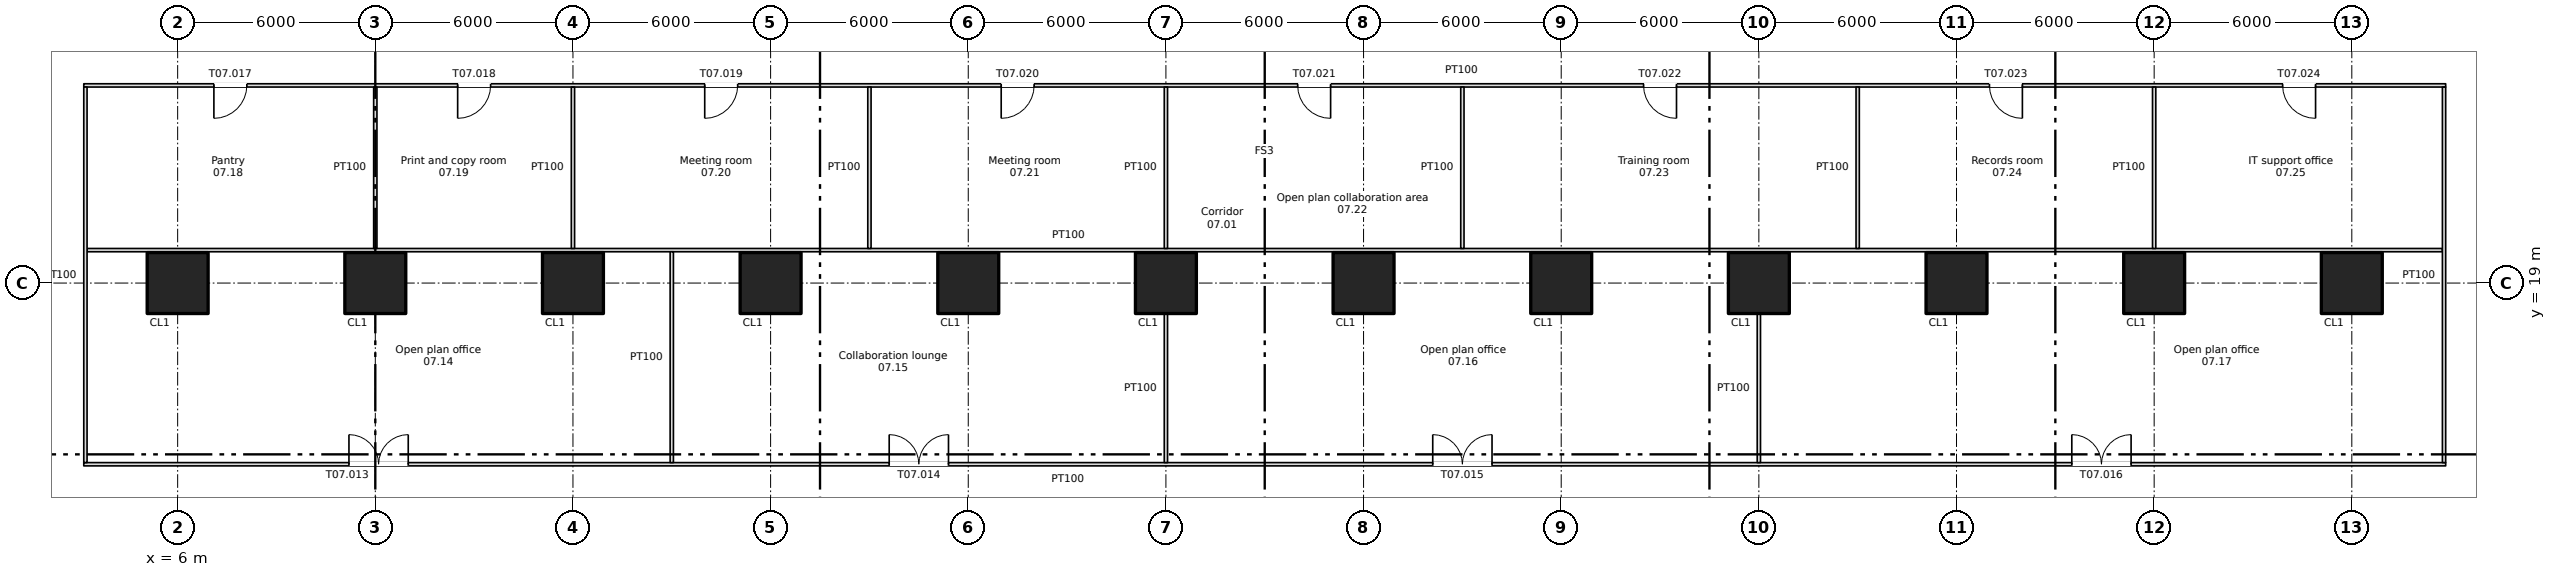
"""IFC4 building model, lengths in metres.
Left out: names, types, materials, properties, quantities, classifications, styles, units other than length and angle.
Written with IfcOpenShell. Run it as: python <this file> out.ifc"""

import sys

from ifc_helpers import new_model, si_unit, direction, frame, frame_2d, origin, origin_2d, place, context, subcontext, project, spatial, rectangle, extrude, element, fill, save


model = new_model("IFC4")
c1 = context("Model", 3, precision=1e-05, world=origin(), true_north=direction((0.0, 1.0)))
c2 = subcontext(c1, "Body", "Model", "MODEL_VIEW")
j1 = project(units=[si_unit("LENGTHUNIT", "METRE"), si_unit("PLANEANGLEUNIT", "RADIAN")], contexts=[c1])
p1 = place(None, origin())
s1 = spatial("IfcSite", under=j1, at=p1, CompositionType="ELEMENT")
p2 = place(p1, origin())
s2 = spatial("IfcBuilding", under=s1, at=p2, CompositionType="ELEMENT")
p3 = place(p2, frame((0.0, 0.0, 26.25)))
s3 = spatial("IfcBuildingStorey", under=s2, at=p3, CompositionType="ELEMENT", Elevation=26.25)
for number, where, z_axis, x_axis in (
    (1, (6.0, 19.0, 0.0), (0.0, 0.0, 1.0), (1.0, 0.0, 0.0)),
    (2, (12.0, 19.0, 0.0), (0.0, 0.0, 1.0), (1.0, 0.0, 0.0)),
    (3, (18.0, 19.0, 0.0), (0.0, 0.0, 1.0), (1.0, 0.0, 0.0)),
    (4, (24.0, 19.0, 0.0), (0.0, 0.0, 1.0), (1.0, 0.0, 0.0)),
    (5, (30.0, 19.0, 0.0), (0.0, 0.0, 1.0), (1.0, 0.0, 0.0)),
    (6, (36.0, 19.0, 0.0), (0.0, 0.0, 1.0), (1.0, 0.0, 0.0)),
    (7, (42.0, 19.0, 0.0), (0.0, 0.0, 1.0), (1.0, 0.0, 0.0)),
    (8, (48.0, 19.0, 0.0), (0.0, 0.0, 1.0), (1.0, 0.0, 0.0)),
    (9, (54.0, 19.0, 0.0), (0.0, 0.0, 1.0), (1.0, 0.0, 0.0)),
    (10, (60.0, 19.0, 0.0), (0.0, 0.0, 1.0), (1.0, 0.0, 0.0)),
    (11, (66.0, 19.0, 0.0), (0.0, 0.0, 1.0), (1.0, 0.0, 0.0)),
    (12, (72.0, 19.0, 0.0), (0.0, 0.0, 1.0), (1.0, 0.0, 0.0)),
):
    element("IfcColumn", number, at=place(p3, frame(where, z_axis=z_axis, x_axis=x_axis)), inside=s3, PredefinedType="COLUMN", context=c2, shape_type="SweptSolid", body=[
        extrude(rectangle(XDim=1.85, YDim=1.85, at=origin_2d()), origin(), (0.0, 0.0, 1.0), 3.35),
    ])
p4 = place(p3, frame((3.15, 13.5, 0.0), z_axis=(0.0, 0.0, 1.0), x_axis=(1.0, 0.0, 0.0)))
e13 = element("IfcWall", 13, at=p4, inside=s3, PredefinedType="PARTITIONING", context=c2, shape_type="SweptSolid", body=[
    extrude(rectangle(XDim=71.7, YDim=0.1, at=frame_2d((35.85, 0.0))), origin(), (0.0, 0.0, 1.0), 3.35),
])
p5 = place(p4, frame((8.05, 0.0, 0.0)))
e14 = element("IfcOpeningElement", 14, at=p5, cuts=e13, PredefinedType="OPENING", context=c2, shape_type="SweptSolid", body=[
    extrude(rectangle(XDim=1.8, YDim=2.1, at=frame_2d((0.9, 1.05))), frame((0.0, 0.06, 0.0), z_axis=(0.0, -1.0, 0.0), x_axis=(1.0, 0.0, 0.0)), (0.0, 0.0, 1.0), 0.12),
])
p6 = place(p4, frame((24.45, 0.0, 0.0)))
e15 = element("IfcOpeningElement", 15, at=p6, cuts=e13, PredefinedType="OPENING", context=c2, shape_type="SweptSolid", body=[
    extrude(rectangle(XDim=1.8, YDim=2.1, at=frame_2d((0.9, 1.05))), frame((0.0, 0.06, 0.0), z_axis=(0.0, -1.0, 0.0), x_axis=(1.0, 0.0, 0.0)), (0.0, 0.0, 1.0), 0.12),
])
p7 = place(p4, frame((40.95, 0.0, 0.0)))
e16 = element("IfcOpeningElement", 16, at=p7, cuts=e13, PredefinedType="OPENING", context=c2, shape_type="SweptSolid", body=[
    extrude(rectangle(XDim=1.8, YDim=2.1, at=frame_2d((0.9, 1.05))), frame((0.0, 0.06, 0.0), z_axis=(0.0, -1.0, 0.0), x_axis=(1.0, 0.0, 0.0)), (0.0, 0.0, 1.0), 0.12),
])
p8 = place(p4, frame((60.35, 0.0, 0.0)))
e17 = element("IfcOpeningElement", 17, at=p8, cuts=e13, PredefinedType="OPENING", context=c2, shape_type="SweptSolid", body=[
    extrude(rectangle(XDim=1.8, YDim=2.1, at=frame_2d((0.9, 1.05))), frame((0.0, 0.06, 0.0), z_axis=(0.0, -1.0, 0.0), x_axis=(1.0, 0.0, 0.0)), (0.0, 0.0, 1.0), 0.12),
])
p9 = place(p3, frame((3.25, 20.0, 0.0), z_axis=(0.0, 0.0, 1.0), x_axis=(1.0, 0.0, 0.0)))
e18 = element("IfcWall", 18, at=p9, inside=s3, PredefinedType="PARTITIONING", context=c2, shape_type="SweptSolid", body=[
    extrude(rectangle(XDim=71.5, YDim=0.1, at=frame_2d((35.75, 0.0))), origin(), (0.0, 0.0, 1.0), 3.35),
])
p10 = place(p3, frame((3.15, 25.0, 0.0), z_axis=(0.0, 0.0, 1.0), x_axis=(1.0, 0.0, 0.0)))
e19 = element("IfcWall", 19, at=p10, inside=s3, PredefinedType="PARTITIONING", context=c2, shape_type="SweptSolid", body=[
    extrude(rectangle(XDim=71.7, YDim=0.1, at=frame_2d((35.85, 0.0))), origin(), (0.0, 0.0, 1.0), 3.35),
])
p11 = place(p10, frame((3.95, 0.0, 0.0)))
e20 = element("IfcOpeningElement", 20, at=p11, cuts=e19, PredefinedType="OPENING", context=c2, shape_type="SweptSolid", body=[
    extrude(rectangle(XDim=1.0, YDim=2.1, at=frame_2d((0.5, 1.05))), frame((0.0, 0.06, 0.0), z_axis=(0.0, -1.0, 0.0), x_axis=(1.0, 0.0, 0.0)), (0.0, 0.0, 1.0), 0.12),
])
p12 = place(p10, frame((11.35, 0.0, 0.0)))
e21 = element("IfcOpeningElement", 21, at=p12, cuts=e19, PredefinedType="OPENING", context=c2, shape_type="SweptSolid", body=[
    extrude(rectangle(XDim=1.0, YDim=2.1, at=frame_2d((0.5, 1.05))), frame((0.0, 0.06, 0.0), z_axis=(0.0, -1.0, 0.0), x_axis=(1.0, 0.0, 0.0)), (0.0, 0.0, 1.0), 0.12),
])
p13 = place(p10, frame((18.85, 0.0, 0.0)))
e22 = element("IfcOpeningElement", 22, at=p13, cuts=e19, PredefinedType="OPENING", context=c2, shape_type="SweptSolid", body=[
    extrude(rectangle(XDim=1.0, YDim=2.1, at=frame_2d((0.5, 1.05))), frame((0.0, 0.06, 0.0), z_axis=(0.0, -1.0, 0.0), x_axis=(1.0, 0.0, 0.0)), (0.0, 0.0, 1.0), 0.12),
])
p14 = place(p10, frame((27.85, 0.0, 0.0)))
e23 = element("IfcOpeningElement", 23, at=p14, cuts=e19, PredefinedType="OPENING", context=c2, shape_type="SweptSolid", body=[
    extrude(rectangle(XDim=1.0, YDim=2.1, at=frame_2d((0.5, 1.05))), frame((0.0, 0.06, 0.0), z_axis=(0.0, -1.0, 0.0), x_axis=(1.0, 0.0, 0.0)), (0.0, 0.0, 1.0), 0.12),
])
p15 = place(p10, frame((36.85, 0.0, 0.0)))
e24 = element("IfcOpeningElement", 24, at=p15, cuts=e19, PredefinedType="OPENING", context=c2, shape_type="SweptSolid", body=[
    extrude(rectangle(XDim=1.0, YDim=2.1, at=frame_2d((0.5, 1.05))), frame((0.0, 0.06, 0.0), z_axis=(0.0, -1.0, 0.0), x_axis=(1.0, 0.0, 0.0)), (0.0, 0.0, 1.0), 0.12),
])
p16 = place(p10, frame((47.35, 0.0, 0.0)))
e25 = element("IfcOpeningElement", 25, at=p16, cuts=e19, PredefinedType="OPENING", context=c2, shape_type="SweptSolid", body=[
    extrude(rectangle(XDim=1.0, YDim=2.1, at=frame_2d((0.5, 1.05))), frame((0.0, 0.06, 0.0), z_axis=(0.0, -1.0, 0.0), x_axis=(1.0, 0.0, 0.0)), (0.0, 0.0, 1.0), 0.12),
])
p17 = place(p10, frame((57.85, 0.0, 0.0)))
e26 = element("IfcOpeningElement", 26, at=p17, cuts=e19, PredefinedType="OPENING", context=c2, shape_type="SweptSolid", body=[
    extrude(rectangle(XDim=1.0, YDim=2.1, at=frame_2d((0.5, 1.05))), frame((0.0, 0.06, 0.0), z_axis=(0.0, -1.0, 0.0), x_axis=(1.0, 0.0, 0.0)), (0.0, 0.0, 1.0), 0.12),
])
p18 = place(p10, frame((66.75, 0.0, 0.0)))
e27 = element("IfcOpeningElement", 27, at=p18, cuts=e19, PredefinedType="OPENING", context=c2, shape_type="SweptSolid", body=[
    extrude(rectangle(XDim=1.0, YDim=2.1, at=frame_2d((0.5, 1.05))), frame((0.0, 0.06, 0.0), z_axis=(0.0, -1.0, 0.0), x_axis=(1.0, 0.0, 0.0)), (0.0, 0.0, 1.0), 0.12),
])
p19 = place(p3, frame((3.2, 13.55, 0.0), z_axis=(0.0, 0.0, 1.0), x_axis=(0.0, 1.0, 0.0)))
e28 = element("IfcWall", 28, at=p19, inside=s3, PredefinedType="PARTITIONING", context=c2, shape_type="SweptSolid", body=[
    extrude(rectangle(XDim=11.4, YDim=0.1, at=frame_2d((5.7, 0.0))), origin(), (0.0, 0.0, 1.0), 3.35),
])
for number, where, z_axis, x_axis in (
    (29, (12.0, 20.05, 0.0), (0.0, 0.0, 1.0), (0.0, 1.0, 0.0)),
    (30, (18.0, 20.05, 0.0), (0.0, 0.0, 1.0), (0.0, 1.0, 0.0)),
):
    element("IfcWall", number, at=place(p3, frame(where, z_axis=z_axis, x_axis=x_axis)), inside=s3, PredefinedType="PARTITIONING", context=c2, shape_type="SweptSolid", body=[
        extrude(rectangle(XDim=4.9, YDim=0.1, at=frame_2d((2.45, 0.0))), origin(), (0.0, 0.0, 1.0), 3.35),
    ])
p20 = place(p3, frame((21.0, 13.55, 0.0), z_axis=(0.0, 0.0, 1.0), x_axis=(0.0, 1.0, 0.0)))
e31 = element("IfcWall", 31, at=p20, inside=s3, PredefinedType="PARTITIONING", context=c2, shape_type="SweptSolid", body=[
    extrude(rectangle(XDim=6.4, YDim=0.1, at=frame_2d((3.2, 0.0))), origin(), (0.0, 0.0, 1.0), 3.35),
])
p21 = place(p3, frame((27.0, 20.05, 0.0), z_axis=(0.0, 0.0, 1.0), x_axis=(0.0, 1.0, 0.0)))
e32 = element("IfcWall", 32, at=p21, inside=s3, PredefinedType="PARTITIONING", context=c2, shape_type="SweptSolid", body=[
    extrude(rectangle(XDim=4.9, YDim=0.1, at=frame_2d((2.45, 0.0))), origin(), (0.0, 0.0, 1.0), 3.35),
])
p22 = place(p3, frame((36.0, 13.55, 0.0), z_axis=(0.0, 0.0, 1.0), x_axis=(0.0, 1.0, 0.0)))
e33 = element("IfcWall", 33, at=p22, inside=s3, PredefinedType="PARTITIONING", context=c2, shape_type="SweptSolid", body=[
    extrude(rectangle(XDim=4.525, YDim=0.1, at=frame_2d((2.262, 0.0))), origin(), (0.0, 0.0, 1.0), 3.35),
])
for number, where, z_axis, x_axis in (
    (34, (36.0, 20.05, 0.0), (0.0, 0.0, 1.0), (0.0, 1.0, 0.0)),
    (35, (45.0, 20.05, 0.0), (0.0, 0.0, 1.0), (0.0, 1.0, 0.0)),
):
    element("IfcWall", number, at=place(p3, frame(where, z_axis=z_axis, x_axis=x_axis)), inside=s3, PredefinedType="PARTITIONING", context=c2, shape_type="SweptSolid", body=[
        extrude(rectangle(XDim=4.9, YDim=0.1, at=frame_2d((2.45, 0.0))), origin(), (0.0, 0.0, 1.0), 3.35),
    ])
p23 = place(p3, frame((54.0, 13.55, 0.0), z_axis=(0.0, 0.0, 1.0), x_axis=(0.0, 1.0, 0.0)))
e36 = element("IfcWall", 36, at=p23, inside=s3, PredefinedType="PARTITIONING", context=c2, shape_type="SweptSolid", body=[
    extrude(rectangle(XDim=4.525, YDim=0.1, at=frame_2d((2.262, 0.0))), origin(), (0.0, 0.0, 1.0), 3.35),
])
for number, where, z_axis, x_axis in (
    (37, (57.0, 20.05, 0.0), (0.0, 0.0, 1.0), (0.0, 1.0, 0.0)),
    (38, (66.0, 20.05, 0.0), (0.0, 0.0, 1.0), (0.0, 1.0, 0.0)),
):
    element("IfcWall", number, at=place(p3, frame(where, z_axis=z_axis, x_axis=x_axis)), inside=s3, PredefinedType="PARTITIONING", context=c2, shape_type="SweptSolid", body=[
        extrude(rectangle(XDim=4.9, YDim=0.1, at=frame_2d((2.45, 0.0))), origin(), (0.0, 0.0, 1.0), 3.35),
    ])
p24 = place(p3, frame((74.8, 13.55, 0.0), z_axis=(0.0, 0.0, 1.0), x_axis=(0.0, 1.0, 0.0)))
e39 = element("IfcWall", 39, at=p24, inside=s3, PredefinedType="PARTITIONING", context=c2, shape_type="SweptSolid", body=[
    extrude(rectangle(XDim=11.4, YDim=0.1, at=frame_2d((5.7, 0.0))), origin(), (0.0, 0.0, 1.0), 3.35),
])
p25 = place(p5, origin())
e40 = element("IfcDoor", 40, at=p25, inside=s3, OperationType="DOUBLE_DOOR_SINGLE_SWING", PredefinedType="DOOR", context=c2, shape_type="SweptSolid", body=[
    extrude(rectangle(XDim=1.8, YDim=2.1, at=frame_2d((0.9, 1.05))), frame((0.0, 0.025, 0.0), z_axis=(0.0, -1.0, 0.0), x_axis=(1.0, 0.0, 0.0)), (0.0, 0.0, 1.0), 0.05),
])
fill(e14, e40)
p26 = place(p6, origin())
e41 = element("IfcDoor", 41, at=p26, inside=s3, OperationType="DOUBLE_DOOR_SINGLE_SWING", PredefinedType="DOOR", context=c2, shape_type="SweptSolid", body=[
    extrude(rectangle(XDim=1.8, YDim=2.1, at=frame_2d((0.9, 1.05))), frame((0.0, 0.025, 0.0), z_axis=(0.0, -1.0, 0.0), x_axis=(1.0, 0.0, 0.0)), (0.0, 0.0, 1.0), 0.05),
])
fill(e15, e41)
p27 = place(p7, origin())
e42 = element("IfcDoor", 42, at=p27, inside=s3, OperationType="DOUBLE_DOOR_SINGLE_SWING", PredefinedType="DOOR", context=c2, shape_type="SweptSolid", body=[
    extrude(rectangle(XDim=1.8, YDim=2.1, at=frame_2d((0.9, 1.05))), frame((0.0, 0.025, 0.0), z_axis=(0.0, -1.0, 0.0), x_axis=(1.0, 0.0, 0.0)), (0.0, 0.0, 1.0), 0.05),
])
fill(e16, e42)
p28 = place(p8, origin())
e43 = element("IfcDoor", 43, at=p28, inside=s3, OperationType="DOUBLE_DOOR_SINGLE_SWING", PredefinedType="DOOR", context=c2, shape_type="SweptSolid", body=[
    extrude(rectangle(XDim=1.8, YDim=2.1, at=frame_2d((0.9, 1.05))), frame((0.0, 0.025, 0.0), z_axis=(0.0, -1.0, 0.0), x_axis=(1.0, 0.0, 0.0)), (0.0, 0.0, 1.0), 0.05),
])
fill(e17, e43)
p29 = place(p11, origin())
e44 = element("IfcDoor", 44, at=p29, inside=s3, OperationType="SINGLE_SWING_LEFT", PredefinedType="DOOR", context=c2, shape_type="SweptSolid", body=[
    extrude(rectangle(XDim=1.0, YDim=2.1, at=frame_2d((0.5, 1.05))), frame((0.0, 0.025, 0.0), z_axis=(0.0, -1.0, 0.0), x_axis=(1.0, 0.0, 0.0)), (0.0, 0.0, 1.0), 0.05),
])
fill(e20, e44)
p30 = place(p12, origin())
e45 = element("IfcDoor", 45, at=p30, inside=s3, OperationType="SINGLE_SWING_LEFT", PredefinedType="DOOR", context=c2, shape_type="SweptSolid", body=[
    extrude(rectangle(XDim=1.0, YDim=2.1, at=frame_2d((0.5, 1.05))), frame((0.0, 0.025, 0.0), z_axis=(0.0, -1.0, 0.0), x_axis=(1.0, 0.0, 0.0)), (0.0, 0.0, 1.0), 0.05),
])
fill(e21, e45)
p31 = place(p13, origin())
e46 = element("IfcDoor", 46, at=p31, inside=s3, OperationType="SINGLE_SWING_LEFT", PredefinedType="DOOR", context=c2, shape_type="SweptSolid", body=[
    extrude(rectangle(XDim=1.0, YDim=2.1, at=frame_2d((0.5, 1.05))), frame((0.0, 0.025, 0.0), z_axis=(0.0, -1.0, 0.0), x_axis=(1.0, 0.0, 0.0)), (0.0, 0.0, 1.0), 0.05),
])
fill(e22, e46)
p32 = place(p14, origin())
e47 = element("IfcDoor", 47, at=p32, inside=s3, OperationType="SINGLE_SWING_LEFT", PredefinedType="DOOR", context=c2, shape_type="SweptSolid", body=[
    extrude(rectangle(XDim=1.0, YDim=2.1, at=frame_2d((0.5, 1.05))), frame((0.0, 0.025, 0.0), z_axis=(0.0, -1.0, 0.0), x_axis=(1.0, 0.0, 0.0)), (0.0, 0.0, 1.0), 0.05),
])
fill(e23, e47)
p33 = place(p15, origin())
e48 = element("IfcDoor", 48, at=p33, inside=s3, OperationType="SINGLE_SWING_RIGHT", PredefinedType="DOOR", context=c2, shape_type="SweptSolid", body=[
    extrude(rectangle(XDim=1.0, YDim=2.1, at=frame_2d((0.5, 1.05))), frame((0.0, 0.025, 0.0), z_axis=(0.0, -1.0, 0.0), x_axis=(1.0, 0.0, 0.0)), (0.0, 0.0, 1.0), 0.05),
])
fill(e24, e48)
p34 = place(p16, origin())
e49 = element("IfcDoor", 49, at=p34, inside=s3, OperationType="SINGLE_SWING_RIGHT", PredefinedType="DOOR", context=c2, shape_type="SweptSolid", body=[
    extrude(rectangle(XDim=1.0, YDim=2.1, at=frame_2d((0.5, 1.05))), frame((0.0, 0.025, 0.0), z_axis=(0.0, -1.0, 0.0), x_axis=(1.0, 0.0, 0.0)), (0.0, 0.0, 1.0), 0.05),
])
fill(e25, e49)
p35 = place(p17, origin())
e50 = element("IfcDoor", 50, at=p35, inside=s3, OperationType="SINGLE_SWING_RIGHT", PredefinedType="DOOR", context=c2, shape_type="SweptSolid", body=[
    extrude(rectangle(XDim=1.0, YDim=2.1, at=frame_2d((0.5, 1.05))), frame((0.0, 0.025, 0.0), z_axis=(0.0, -1.0, 0.0), x_axis=(1.0, 0.0, 0.0)), (0.0, 0.0, 1.0), 0.05),
])
fill(e26, e50)
p36 = place(p18, origin())
e51 = element("IfcDoor", 51, at=p36, inside=s3, OperationType="SINGLE_SWING_RIGHT", PredefinedType="DOOR", context=c2, shape_type="SweptSolid", body=[
    extrude(rectangle(XDim=1.0, YDim=2.1, at=frame_2d((0.5, 1.05))), frame((0.0, 0.025, 0.0), z_axis=(0.0, -1.0, 0.0), x_axis=(1.0, 0.0, 0.0)), (0.0, 0.0, 1.0), 0.05),
])
fill(e27, e51)
save(model, sys.argv[1])
